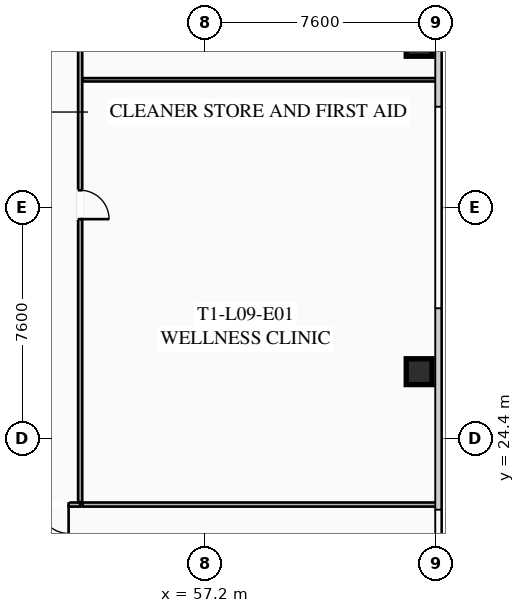
"""IFC4 building model, lengths in metres.
Left out: names, types, materials, properties, quantities, classifications, styles, units other than length and angle.
Written with IfcOpenShell. Run it as: python <this file> out.ifc"""

import sys

from ifc_helpers import new_model, si_unit, direction, frame, frame_2d, origin, origin_2d, place, context, subcontext, project, spatial, rectangle, hollow_rectangle, extrude, element, fill, save


model = new_model("IFC4")
c1 = context("Model", 3, precision=1e-05, world=origin(), true_north=direction((0.0, 1.0)))
c2 = subcontext(c1, "Body", "Model", "MODEL_VIEW")
j1 = project(units=[si_unit("LENGTHUNIT", "METRE"), si_unit("PLANEANGLEUNIT", "RADIAN")], contexts=[c1])
p1 = place(None, origin())
s1 = spatial("IfcSite", under=j1, at=p1, CompositionType="ELEMENT")
p2 = place(p1, origin())
s2 = spatial("IfcBuilding", under=s1, at=p2, CompositionType="ELEMENT")
p3 = place(p2, frame((0.0, 0.0, 38.8)))
s3 = spatial("IfcBuildingStorey", under=s2, at=p3, CompositionType="ELEMENT", Elevation=38.8)
for number, where, z_axis, x_axis in (
    (1, (64.25, 26.6, 0.0), (0.0, 0.0, 1.0), (1.0, 0.0, 0.0)),
    (2, (64.25, 37.4, 0.0), (0.0, 0.0, 1.0), (1.0, 0.0, 0.0)),
):
    element("IfcColumn", number, at=place(p3, frame(where, z_axis=z_axis, x_axis=x_axis)), inside=s3, PredefinedType="COLUMN", context=c2, shape_type="SweptSolid", body=[
        extrude(hollow_rectangle(XDim=0.85, YDim=0.85, WallThickness=0.035, at=origin_2d()), origin(), (0.0, 0.0, 1.0), 3.35),
    ])
p4 = place(p3, frame((53.1, 22.23, 0.0), z_axis=(0.0, 0.0, 1.0), x_axis=(-1.0, 0.0, 0.0)))
e3 = element("IfcWall", 3, at=p4, inside=s3, PredefinedType="PARTITIONING", context=c2, shape_type="SweptSolid", body=[
    extrude(rectangle(XDim=30.75, YDim=0.135, at=frame_2d((15.375, 0.0))), origin(), (0.0, 0.0, 1.0), 2.703),
])
p5 = place(p4, frame((29.42, 0.0, 0.0)))
e4 = element("IfcOpeningElement", 4, at=p5, cuts=e3, PredefinedType="OPENING", context=c2, shape_type="SweptSolid", body=[
    extrude(rectangle(XDim=0.95, YDim=2.05, at=frame_2d((0.475, 1.025))), frame((0.0, 0.077, 0.0), z_axis=(0.0, -1.0, 0.0), x_axis=(1.0, 0.0, 0.0)), (0.0, 0.0, 1.0), 0.155),
])
p6 = place(p4, frame((10.388, 0.0, 0.0)))
e5 = element("IfcOpeningElement", 5, at=p6, cuts=e3, PredefinedType="OPENING", context=c2, shape_type="SweptSolid", body=[
    extrude(rectangle(XDim=0.95, YDim=2.05, at=frame_2d((0.475, 1.025))), frame((0.0, 0.077, 0.0), z_axis=(0.0, -1.0, 0.0), x_axis=(1.0, 0.0, 0.0)), (0.0, 0.0, 1.0), 0.155),
])
p7 = place(p4, frame((0.38, 0.0, 0.0)))
e6 = element("IfcOpeningElement", 6, at=p7, cuts=e3, PredefinedType="OPENING", context=c2, shape_type="SweptSolid", body=[
    extrude(rectangle(XDim=0.95, YDim=2.05, at=frame_2d((0.475, 1.025))), frame((0.0, 0.077, 0.0), z_axis=(0.0, -1.0, 0.0), x_axis=(1.0, 0.0, 0.0)), (0.0, 0.0, 1.0), 0.155),
])
p8 = place(p3, frame((53.1, 43.22, 0.0), z_axis=(0.0, 0.0, 1.0), x_axis=(0.0, -1.0, 0.0)))
e7 = element("IfcWall", 7, at=p8, inside=s3, PredefinedType="PARTITIONING", context=c2, shape_type="SweptSolid", body=[
    extrude(rectangle(XDim=20.91, YDim=0.135, at=frame_2d((10.455, 0.0))), origin(), (0.0, 0.0, 1.0), 2.703),
])
p9 = place(p8, frame((10.653, 0.0, 0.0)))
e8 = element("IfcOpeningElement", 8, at=p9, cuts=e7, PredefinedType="OPENING", context=c2, shape_type="SweptSolid", body=[
    extrude(rectangle(XDim=0.95, YDim=2.05, at=frame_2d((0.475, 1.025))), frame((0.0, 0.077, 0.0), z_axis=(0.0, -1.0, 0.0), x_axis=(1.0, 0.0, 0.0)), (0.0, 0.0, 1.0), 0.155),
])
p10 = place(p8, frame((0.3, 0.0, 0.0)))
e9 = element("IfcOpeningElement", 9, at=p10, cuts=e7, PredefinedType="OPENING", context=c2, shape_type="SweptSolid", body=[
    extrude(rectangle(XDim=0.95, YDim=2.05, at=frame_2d((0.475, 1.025))), frame((0.0, 0.077, 0.0), z_axis=(0.0, -1.0, 0.0), x_axis=(1.0, 0.0, 0.0)), (0.0, 0.0, 1.0), 0.155),
])
p11 = place(p3, frame((53.18, 22.23, 0.0), z_axis=(0.0, 0.0, 1.0), x_axis=(1.0, 0.0, 0.0)))
e10 = element("IfcWall", 10, at=p11, inside=s3, PredefinedType="PARTITIONING", context=c2, shape_type="SweptSolid", body=[
    extrude(rectangle(XDim=11.7, YDim=0.135, at=frame_2d((5.85, 0.0))), origin(), (0.0, 0.0, 1.0), 2.703),
])
p12 = place(p3, frame((53.18, 36.2, 0.0), z_axis=(0.0, 0.0, 1.0), x_axis=(1.0, 0.0, 0.0)))
e11 = element("IfcWall", 11, at=p12, inside=s3, PredefinedType="PARTITIONING", context=c2, shape_type="SweptSolid", body=[
    extrude(rectangle(XDim=11.7, YDim=0.11, at=frame_2d((5.85, 0.0))), origin(), (0.0, 0.0, 1.0), 2.703),
])
p13 = place(p7, origin())
e12 = element("IfcDoor", 12, at=p13, inside=s3, OperationType="SINGLE_SWING_LEFT", PredefinedType="DOOR", context=c2, shape_type="SweptSolid", body=[
    extrude(rectangle(XDim=0.95, YDim=2.05, at=frame_2d((0.475, 1.025))), frame((0.0, 0.025, 0.0), z_axis=(0.0, -1.0, 0.0), x_axis=(1.0, 0.0, 0.0)), (0.0, 0.0, 1.0), 0.05),
])
fill(e6, e12)
p14 = place(p9, origin())
e13 = element("IfcDoor", 13, at=p14, inside=s3, OperationType="SINGLE_SWING_RIGHT", PredefinedType="DOOR", context=c2, shape_type="SweptSolid", body=[
    extrude(rectangle(XDim=0.95, YDim=2.05, at=frame_2d((0.475, 1.025))), frame((0.0, 0.025, 0.0), z_axis=(0.0, -1.0, 0.0), x_axis=(1.0, 0.0, 0.0)), (0.0, 0.0, 1.0), 0.05),
])
fill(e8, e13)
save(model, sys.argv[1])
